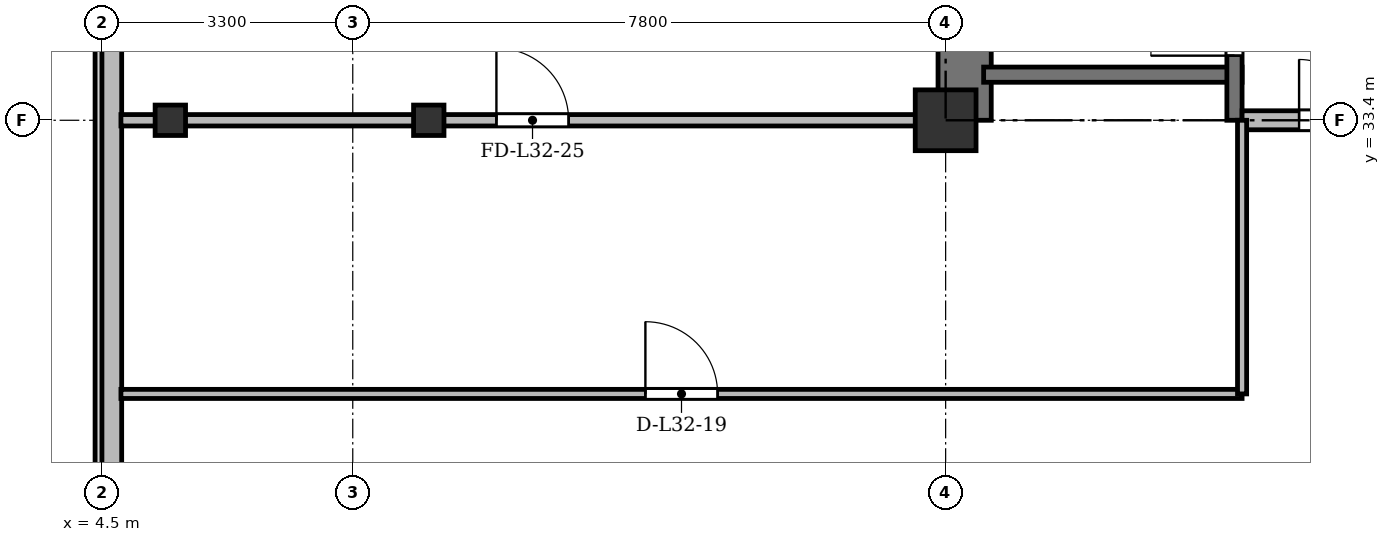
"""IFC4 building model, lengths in metres.
Left out: names, types, materials, properties, quantities, classifications, styles, units other than length and angle.
Written with IfcOpenShell. Run it as: python <this file> out.ifc"""

import sys

from ifc_helpers import new_model, si_unit, direction, frame, frame_2d, origin, origin_2d, place, context, subcontext, project, spatial, rectangle, i_section, extrude, source, transform, mapped, element, fill, save


model = new_model("IFC4")
c1 = context("Model", 3, precision=1e-05, world=origin(), true_north=direction((0.0, 1.0)))
c2 = subcontext(c1, "Body", "Model", "MODEL_VIEW")
j1 = project(units=[si_unit("LENGTHUNIT", "METRE"), si_unit("PLANEANGLEUNIT", "RADIAN")], contexts=[c1])
p1 = place(None, origin())
s1 = spatial("IfcSite", under=j1, at=p1, CompositionType="ELEMENT")
p2 = place(p1, origin())
s2 = spatial("IfcBuilding", under=s1, at=p2, CompositionType="ELEMENT")
p3 = place(p2, frame((0.0, 0.0, 124.9)))
s3 = spatial("IfcBuildingStorey", under=s2, at=p3, CompositionType="ELEMENT", Elevation=124.9)
m1 = source(origin(), c2, "Body", "SweptSolid", [
    extrude(i_section(OverallWidth=0.4, OverallDepth=0.4, WebThickness=0.022, FlangeThickness=0.035, at=origin_2d()), origin(), (0.0, 0.0, 1.0), 3.6),
])
for number, where, z_axis, x_axis in (
    (1, (5.4, 33.4, 0.0), (0.0, 0.0, 1.0), (1.0, 0.0, 0.0)),
    (2, (8.8, 33.4, 0.0), (0.0, 0.0, 1.0), (1.0, 0.0, 0.0)),
):
    element("IfcColumn", number, at=place(p3, frame(where, z_axis=z_axis, x_axis=x_axis)), inside=s3, PredefinedType="COLUMN", context=c2, shape_type="MappedRepresentation", body=[
        mapped(m1, transform((0.0, 0.0, 0.0), x_axis=(1.0, 0.0, 0.0), y_axis=(0.0, 1.0, 0.0), z_axis=(0.0, 0.0, 1.0), scale=1.0)),
    ])
m2 = source(origin(), c2, "Body", "SweptSolid", [
    extrude(rectangle(XDim=0.8, YDim=0.8, at=origin_2d()), origin(), (0.0, 0.0, 1.0), 3.6),
])
p4 = place(p3, frame((15.6, 33.4, 0.0), z_axis=(0.0, 0.0, 1.0), x_axis=(1.0, 0.0, 0.0)))
e3 = element("IfcColumn", 3, at=p4, inside=s3, PredefinedType="COLUMN", context=c2, shape_type="MappedRepresentation", body=[
    mapped(m2, transform((0.0, 0.0, 0.0), x_axis=(1.0, 0.0, 0.0), y_axis=(0.0, 1.0, 0.0), z_axis=(0.0, 0.0, 1.0), scale=1.0)),
])
p5 = place(p3, frame((4.63, 5.9, 0.0), z_axis=(0.0, 0.0, 1.0), x_axis=(0.0, 1.0, 0.0)))
e4 = element("IfcWall", 4, at=p5, inside=s3, PredefinedType="SOLIDWALL", context=c2, shape_type="SweptSolid", body=[
    extrude(rectangle(XDim=39.6, YDim=0.26, at=frame_2d((19.8, 0.0))), origin(), (0.0, 0.0, 1.0), 3.34),
])
p6 = place(p5, frame((1.45, 0.0, 0.92)))
e5 = element("IfcOpeningElement", 5, at=p6, cuts=e4, PredefinedType="OPENING", context=c2, shape_type="SweptSolid", body=[
    extrude(rectangle(XDim=1.2, YDim=1.65, at=frame_2d((0.6, 0.825))), frame((0.0, 0.14, 0.0), z_axis=(0.0, -1.0, 0.0), x_axis=(1.0, 0.0, 0.0)), (0.0, 0.0, 1.0), 0.28),
])
p7 = place(p5, frame((4.2, 0.0, 0.92)))
e6 = element("IfcOpeningElement", 6, at=p7, cuts=e4, PredefinedType="OPENING", context=c2, shape_type="SweptSolid", body=[
    extrude(rectangle(XDim=2.6, YDim=1.9, at=frame_2d((1.3, 0.95))), frame((0.0, 0.14, 0.0), z_axis=(0.0, -1.0, 0.0), x_axis=(1.0, 0.0, 0.0)), (0.0, 0.0, 1.0), 0.28),
])
p8 = place(p5, frame((8.4, 0.0, 0.92)))
e7 = element("IfcOpeningElement", 7, at=p8, cuts=e4, PredefinedType="OPENING", context=c2, shape_type="SweptSolid", body=[
    extrude(rectangle(XDim=2.6, YDim=1.9, at=frame_2d((1.3, 0.95))), frame((0.0, 0.14, 0.0), z_axis=(0.0, -1.0, 0.0), x_axis=(1.0, 0.0, 0.0)), (0.0, 0.0, 1.0), 0.28),
])
p9 = place(p5, frame((15.6, 0.0, 0.92)))
e8 = element("IfcOpeningElement", 8, at=p9, cuts=e4, PredefinedType="OPENING", context=c2, shape_type="SweptSolid", body=[
    extrude(rectangle(XDim=2.6, YDim=1.9, at=frame_2d((1.3, 0.95))), frame((0.0, 0.14, 0.0), z_axis=(0.0, -1.0, 0.0), x_axis=(1.0, 0.0, 0.0)), (0.0, 0.0, 1.0), 0.28),
])
p10 = place(p5, frame((29.6, 0.0, 0.92)))
e9 = element("IfcOpeningElement", 9, at=p10, cuts=e4, PredefinedType="OPENING", context=c2, shape_type="SweptSolid", body=[
    extrude(rectangle(XDim=2.6, YDim=1.9, at=frame_2d((1.3, 0.95))), frame((0.0, 0.14, 0.0), z_axis=(0.0, -1.0, 0.0), x_axis=(1.0, 0.0, 0.0)), (0.0, 0.0, 1.0), 0.28),
])
p11 = place(p5, frame((37.25, 0.0, 0.92)))
e10 = element("IfcOpeningElement", 10, at=p11, cuts=e4, PredefinedType="OPENING", context=c2, shape_type="SweptSolid", body=[
    extrude(rectangle(XDim=1.2, YDim=1.65, at=frame_2d((0.6, 0.825))), frame((0.0, 0.14, 0.0), z_axis=(0.0, -1.0, 0.0), x_axis=(1.0, 0.0, 0.0)), (0.0, 0.0, 1.0), 0.28),
])
p12 = place(p3, frame((15.85, 33.4, 0.0), z_axis=(0.0, 0.0, 1.0), x_axis=(0.0, 1.0, 0.0)))
e11 = element("IfcWall", 11, at=p12, inside=s3, PredefinedType="SHEAR", context=c2, shape_type="SweptSolid", body=[
    extrude(rectangle(XDim=11.7, YDim=0.7, at=frame_2d((5.85, 0.0))), origin(), (0.0, 0.0, 1.0), 3.34),
])
p13 = place(p3, frame((16.1, 34.0, 0.0), z_axis=(0.0, 0.0, 1.0), x_axis=(1.0, 0.0, 0.0)))
e12 = element("IfcWall", 12, at=p13, inside=s3, PredefinedType="SHEAR", context=c2, shape_type="SweptSolid", body=[
    extrude(rectangle(XDim=3.4, YDim=0.2, at=frame_2d((1.7, 0.0))), origin(), (0.0, 0.0, 1.0), 3.34),
])
p14 = place(p3, frame((19.4, 33.4, 0.0), z_axis=(0.0, 0.0, 1.0), x_axis=(0.0, 1.0, 0.0)))
e13 = element("IfcWall", 13, at=p14, inside=s3, PredefinedType="SHEAR", context=c2, shape_type="SweptSolid", body=[
    extrude(rectangle(XDim=11.1, YDim=0.2, at=frame_2d((5.55, 0.0))), origin(), (0.0, 0.0, 1.0), 3.34),
])
p15 = place(p14, frame((0.85, 0.0, 0.0)))
e14 = element("IfcOpeningElement", 14, at=p15, cuts=e13, PredefinedType="OPENING", context=c2, shape_type="SweptSolid", body=[
    extrude(rectangle(XDim=1.1, YDim=2.15, at=frame_2d((0.55, 1.075))), frame((0.0, 0.11, 0.0), z_axis=(0.0, -1.0, 0.0), x_axis=(1.0, 0.0, 0.0)), (0.0, 0.0, 1.0), 0.22),
])
p16 = place(p3, frame((19.5, 33.4, 0.0), z_axis=(0.0, 0.0, 1.0), x_axis=(1.0, 0.0, 0.0)))
e15 = element("IfcWall", 15, at=p16, inside=s3, PredefinedType="PARTITIONING", context=c2, shape_type="SweptSolid", body=[
    extrude(rectangle(XDim=6.8, YDim=0.25, at=frame_2d((3.4, 0.0))), origin(), (0.0, 0.0, 1.0), 2.752),
])
p17 = place(p16, frame((0.75, 0.0, 0.0)))
e16 = element("IfcOpeningElement", 16, at=p17, cuts=e15, PredefinedType="OPENING", context=c2, shape_type="SweptSolid", body=[
    extrude(rectangle(XDim=1.6, YDim=2.2, at=frame_2d((0.8, 1.1))), frame((0.0, 0.135, 0.0), z_axis=(0.0, -1.0, 0.0), x_axis=(1.0, 0.0, 0.0)), (0.0, 0.0, 1.0), 0.27),
])
p18 = place(p3, frame((4.75, 29.8, 0.0), z_axis=(0.0, 0.0, 1.0), x_axis=(1.0, 0.0, 0.0)))
e17 = element("IfcWall", 17, at=p18, inside=s3, PredefinedType="PARTITIONING", context=c2, shape_type="SweptSolid", body=[
    extrude(rectangle(XDim=14.75, YDim=0.12, at=frame_2d((7.375, 0.0))), origin(), (0.0, 0.0, 1.0), 2.84),
])
p19 = place(p18, frame((6.9, 0.0, 0.0)))
e18 = element("IfcOpeningElement", 18, at=p19, cuts=e17, PredefinedType="OPENING", context=c2, shape_type="SweptSolid", body=[
    extrude(rectangle(XDim=0.95, YDim=2.15, at=frame_2d((0.475, 1.075))), frame((0.0, 0.07, 0.0), z_axis=(0.0, -1.0, 0.0), x_axis=(1.0, 0.0, 0.0)), (0.0, 0.0, 1.0), 0.14),
])
p20 = place(p3, frame((19.5, 29.8, 0.0), z_axis=(0.0, 0.0, 1.0), x_axis=(0.0, 1.0, 0.0)))
e19 = element("IfcWall", 19, at=p20, inside=s3, PredefinedType="PARTITIONING", context=c2, shape_type="SweptSolid", body=[
    extrude(rectangle(XDim=3.6, YDim=0.12, at=frame_2d((1.8, 0.0))), origin(), (0.0, 0.0, 1.0), 2.752),
])
p21 = place(p3, frame((4.75, 33.4, 0.0), z_axis=(0.0, 0.0, 1.0), x_axis=(1.0, 0.0, 0.0)))
e20 = element("IfcWall", 20, at=p21, inside=s3, PredefinedType="PARTITIONING", context=c2, shape_type="SweptSolid", body=[
    extrude(rectangle(XDim=10.85, YDim=0.15, at=frame_2d((5.425, 0.0))), origin(), (0.0, 0.0, 1.0), 2.752),
])
p22 = place(p21, frame((4.94, 0.0, 0.0)))
e21 = element("IfcOpeningElement", 21, at=p22, cuts=e20, PredefinedType="OPENING", context=c2, shape_type="SweptSolid", body=[
    extrude(rectangle(XDim=0.95, YDim=2.15, at=frame_2d((0.475, 1.075))), frame((0.0, 0.085, 0.0), z_axis=(0.0, -1.0, 0.0), x_axis=(1.0, 0.0, 0.0)), (0.0, 0.0, 1.0), 0.17),
])
m3 = source(origin(), c2, "Body", "SweptSolid", [
    extrude(rectangle(XDim=1.1, YDim=2.15, at=frame_2d((0.55, 1.075))), frame((0.0, 0.025, 0.0), z_axis=(0.0, -1.0, 0.0), x_axis=(1.0, 0.0, 0.0)), (0.0, 0.0, 1.0), 0.05),
])
p23 = place(p15, origin())
e22 = element("IfcDoor", 22, at=p23, inside=s3, OperationType="SINGLE_SWING_LEFT", PredefinedType="DOOR", context=c2, shape_type="MappedRepresentation", body=[
    mapped(m3, transform((0.0, 0.0, 0.0), x_axis=(1.0, 0.0, 0.0), y_axis=(0.0, 1.0, 0.0), z_axis=(0.0, 0.0, 1.0), scale=1.0)),
])
fill(e14, e22)
m4 = source(origin(), c2, "Body", "SweptSolid", [
    extrude(rectangle(XDim=1.6, YDim=2.2, at=frame_2d((0.8, 1.1))), frame((0.0, 0.025, 0.0), z_axis=(0.0, -1.0, 0.0), x_axis=(1.0, 0.0, 0.0)), (0.0, 0.0, 1.0), 0.05),
])
p24 = place(p17, origin())
e23 = element("IfcDoor", 23, at=p24, inside=s3, OperationType="DOUBLE_DOOR_SINGLE_SWING", PredefinedType="DOOR", context=c2, shape_type="MappedRepresentation", body=[
    mapped(m4, transform((0.0, 0.0, 0.0), x_axis=(1.0, 0.0, 0.0), y_axis=(0.0, 1.0, 0.0), z_axis=(0.0, 0.0, 1.0), scale=1.0)),
])
fill(e16, e23)
m5 = source(origin(), c2, "Body", "SweptSolid", [
    extrude(rectangle(XDim=0.95, YDim=2.15, at=frame_2d((0.475, 1.075))), frame((0.0, 0.025, 0.0), z_axis=(0.0, -1.0, 0.0), x_axis=(1.0, 0.0, 0.0)), (0.0, 0.0, 1.0), 0.05),
])
p25 = place(p19, origin())
e24 = element("IfcDoor", 24, at=p25, inside=s3, OperationType="SINGLE_SWING_LEFT", PredefinedType="DOOR", context=c2, shape_type="MappedRepresentation", body=[
    mapped(m5, transform((0.0, 0.0, 0.0), x_axis=(1.0, 0.0, 0.0), y_axis=(0.0, 1.0, 0.0), z_axis=(0.0, 0.0, 1.0), scale=1.0)),
])
fill(e18, e24)
p26 = place(p22, origin())
e25 = element("IfcDoor", 25, at=p26, inside=s3, OperationType="SINGLE_SWING_LEFT", PredefinedType="DOOR", context=c2, shape_type="MappedRepresentation", body=[
    mapped(m5, transform((0.0, 0.0, 0.0), x_axis=(1.0, 0.0, 0.0), y_axis=(0.0, 1.0, 0.0), z_axis=(0.0, 0.0, 1.0), scale=1.0)),
])
fill(e21, e25)
save(model, sys.argv[1])
